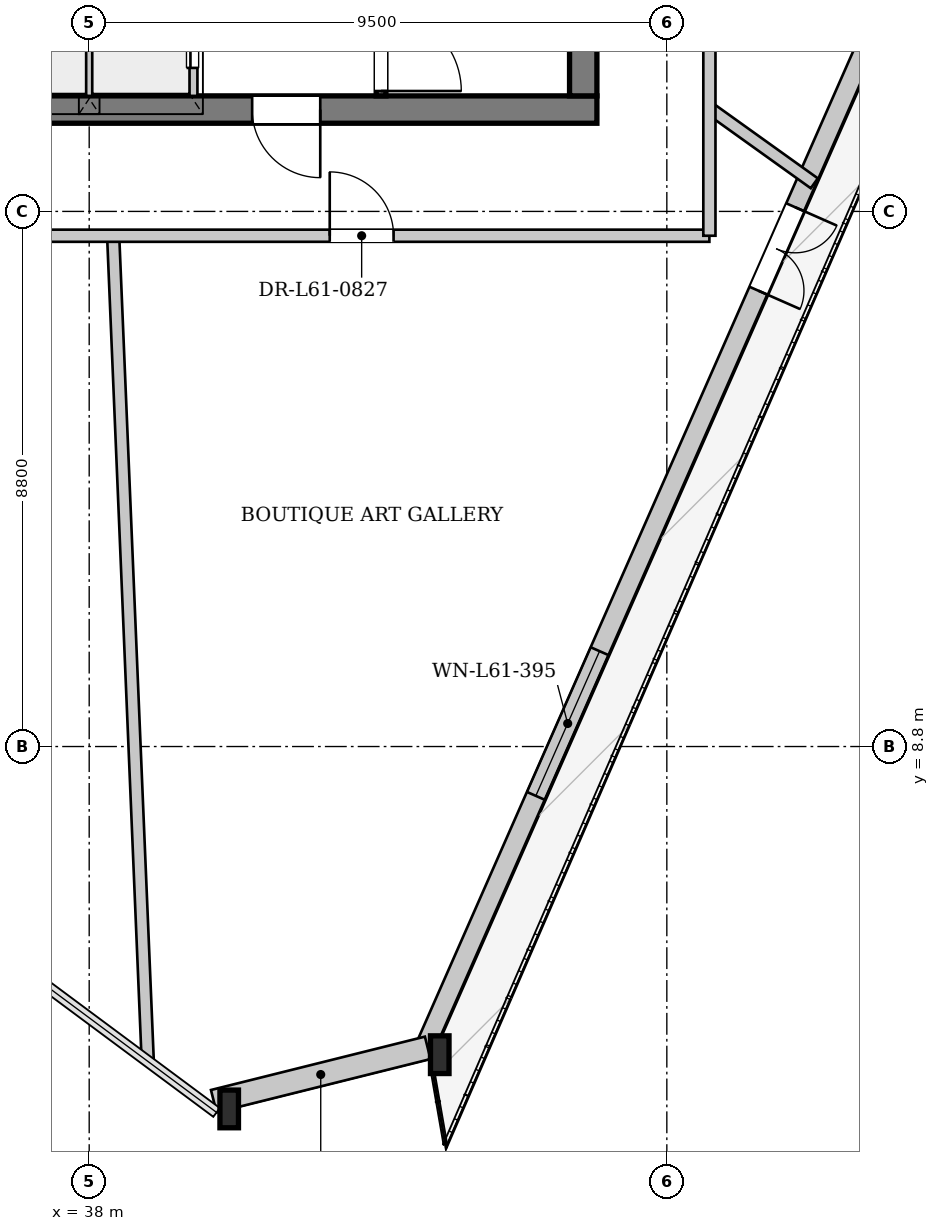
"""IFC4 building model, lengths in metres.
Left out: names, types, materials, properties, quantities, classifications, styles, units other than length and angle.
Written with IfcOpenShell. Run it as: python <this file> out.ifc"""

import sys

from ifc_helpers import new_model, si_unit, direction, frame, frame_2d, origin, origin_2d, place, context, subcontext, project, spatial, rectangle, i_section, extrude, source, transform, mapped, element, fill, save


model = new_model("IFC4")
c1 = context("Model", 3, precision=1e-05, world=origin(), true_north=direction((0.0, 1.0)))
c2 = subcontext(c1, "Body", "Model", "MODEL_VIEW")
j1 = project(units=[si_unit("LENGTHUNIT", "METRE"), si_unit("PLANEANGLEUNIT", "RADIAN")], contexts=[c1])
p1 = place(None, origin())
s1 = spatial("IfcSite", under=j1, at=p1, CompositionType="ELEMENT")
p2 = place(p1, origin())
s2 = spatial("IfcBuilding", under=s1, at=p2, CompositionType="ELEMENT")
p3 = place(p2, frame((0.0, 0.0, 230.9)))
s3 = spatial("IfcBuildingStorey", under=s2, at=p3, CompositionType="ELEMENT", Elevation=230.9)
m1 = source(origin(), c2, "Body", "SweptSolid", [
    extrude(i_section(OverallWidth=0.305, OverallDepth=0.62, WebThickness=0.021, FlangeThickness=0.04, at=origin_2d()), origin(), (0.0, 0.0, 1.0), 3.462),
])
p4 = place(p3, frame((40.095, 2.783, 0.0), z_axis=(0.120094666546, 0.033144153421, 0.992209018383), x_axis=(-0.266037825823, 0.963962590162, 0.0)))
e1 = element("IfcColumn", 1, at=p4, inside=s3, PredefinedType="COLUMN", context=c2, shape_type="MappedRepresentation", body=[
    mapped(m1, transform((0.0, 0.0, 0.0), x_axis=(1.0, 0.0, 0.0), y_axis=(0.0, 1.0, 0.0), z_axis=(0.0, 0.0, 1.0), scale=1.0)),
])
m2 = source(origin(), c2, "Body", "SweptSolid", [
    extrude(i_section(OverallWidth=0.305, OverallDepth=0.62, WebThickness=0.021, FlangeThickness=0.04, at=origin_2d()), origin(), (0.0, 0.0, 1.0), 3.451),
])
p5 = place(p3, frame((43.613, 3.66, 0.0), z_axis=(0.088135401789, 0.041662722034, 0.995236840428), x_axis=(-0.427368834073, 0.90407736376, 0.0)))
e2 = element("IfcColumn", 2, at=p5, inside=s3, PredefinedType="COLUMN", context=c2, shape_type="MappedRepresentation", body=[
    mapped(m2, transform((0.0, 0.0, 0.0), x_axis=(1.0, 0.0, 0.0), y_axis=(0.0, 1.0, 0.0), z_axis=(0.0, 0.0, 1.0), scale=1.0)),
])
p6 = place(p3, frame((52.708, 24.702, 0.0), z_axis=(0.0, 0.0, 1.0), x_axis=(-0.403169735339, -0.915125217938, 0.0)))
e3 = element("IfcWall", 3, at=p6, inside=s3, PredefinedType="SOLIDWALL", context=c2, shape_type="SweptSolid", body=[
    extrude(rectangle(XDim=22.923, YDim=0.32, at=frame_2d((11.461, 0.0))), origin(), (0.0, 0.0, 1.0), 2.872),
])
p7 = place(p6, frame((7.685, 0.0, 0.0)))
e4 = element("IfcOpeningElement", 4, at=p7, cuts=e3, PredefinedType="OPENING", context=c2, shape_type="SweptSolid", body=[
    extrude(rectangle(XDim=1.5, YDim=2.3, at=frame_2d((0.75, 1.15))), frame((0.0, 0.17, 0.0), z_axis=(0.0, -1.0, 0.0), x_axis=(1.0, 0.0, 0.0)), (0.0, 0.0, 1.0), 0.34),
])
p8 = place(p6, frame((15.663, 0.0, 0.402)))
e5 = element("IfcOpeningElement", 5, at=p8, cuts=e3, PredefinedType="OPENING", context=c2, shape_type="SweptSolid", body=[
    extrude(rectangle(XDim=2.6, YDim=2.35, at=frame_2d((1.3, 1.175))), frame((0.0, 0.17, 0.0), z_axis=(0.0, -1.0, 0.0), x_axis=(1.0, 0.0, 0.0)), (0.0, 0.0, 1.0), 0.34),
])
p9 = place(p3, frame((43.567, 3.845, 0.0), z_axis=(0.0, 0.0, 1.0), x_axis=(-0.970284902679, -0.241965302541, 0.0)))
e6 = element("IfcWall", 6, at=p9, inside=s3, PredefinedType="SOLIDWALL", context=c2, shape_type="SweptSolid", body=[
    extrude(rectangle(XDim=3.626, YDim=0.38, at=frame_2d((1.813, 0.0))), origin(), (0.0, 0.0, 1.0), 2.872),
])
p10 = place(p3, frame((46.35, 19.275, 0.0), z_axis=(0.0, 0.0, 1.0), x_axis=(-1.0, 0.0, 0.0)))
e7 = element("IfcWall", 7, at=p10, inside=s3, PredefinedType="SHEAR", context=c2, shape_type="SweptSolid", body=[
    extrude(rectangle(XDim=16.7, YDim=0.45, at=frame_2d((8.35, 0.0))), origin(), (0.0, 0.0, 1.0), 3.38),
])
p11 = place(p10, frame((4.55, 0.0, 0.0)))
e8 = element("IfcOpeningElement", 8, at=p11, cuts=e7, PredefinedType="OPENING", context=c2, shape_type="SweptSolid", body=[
    extrude(rectangle(XDim=1.12, YDim=2.25, at=frame_2d((0.56, 1.125))), frame((0.0, 0.235, 0.0), z_axis=(0.0, -1.0, 0.0), x_axis=(1.0, 0.0, 0.0)), (0.0, 0.0, 1.0), 0.47),
])
p12 = place(p10, frame((11.05, 0.0, 0.0)))
e9 = element("IfcOpeningElement", 9, at=p12, cuts=e7, PredefinedType="OPENING", context=c2, shape_type="SweptSolid", body=[
    extrude(rectangle(XDim=1.12, YDim=2.25, at=frame_2d((0.56, 1.125))), frame((0.0, 0.235, 0.0), z_axis=(0.0, -1.0, 0.0), x_axis=(1.0, 0.0, 0.0)), (0.0, 0.0, 1.0), 0.47),
])
p13 = place(p3, frame((46.125, 33.7, 0.0), z_axis=(0.0, 0.0, 1.0), x_axis=(0.0, -1.0, 0.0)))
e10 = element("IfcWall", 10, at=p13, inside=s3, PredefinedType="SHEAR", context=c2, shape_type="SweptSolid", body=[
    extrude(rectangle(XDim=14.2, YDim=0.45, at=frame_2d((7.1, 0.0))), origin(), (0.0, 0.0, 1.0), 3.38),
])
p14 = place(p13, frame((5.18, 0.0, 0.0)))
e11 = element("IfcOpeningElement", 11, at=p14, cuts=e10, PredefinedType="OPENING", context=c2, shape_type="SweptSolid", body=[
    extrude(rectangle(XDim=1.6, YDim=2.2, at=frame_2d((0.8, 1.1))), frame((0.0, 0.235, 0.0), z_axis=(0.0, -1.0, 0.0), x_axis=(1.0, 0.0, 0.0)), (0.0, 0.0, 1.0), 0.47),
])
p15 = place(p13, frame((2.05, 0.0, 0.0)))
e12 = element("IfcOpeningElement", 12, at=p15, cuts=e10, PredefinedType="OPENING", context=c2, shape_type="SweptSolid", body=[
    extrude(rectangle(XDim=0.95, YDim=2.1, at=frame_2d((0.475, 1.05))), frame((0.0, 0.235, 0.0), z_axis=(0.0, -1.0, 0.0), x_axis=(1.0, 0.0, 0.0)), (0.0, 0.0, 1.0), 0.47),
])
p16 = place(p3, frame((42.8, 26.96, 0.0), z_axis=(0.0, 0.0, 1.0), x_axis=(0.0, -1.0, 0.0)))
e13 = element("IfcWall", 13, at=p16, inside=s3, PredefinedType="PARTITIONING", context=c2, shape_type="SweptSolid", body=[
    extrude(rectangle(XDim=7.46, YDim=0.16, at=frame_2d((3.73, 0.0))), origin(), (0.0, 0.0, 1.0), 3.38),
])
p17 = place(p16, frame((6.06, 0.0, 0.0)))
e14 = element("IfcOpeningElement", 14, at=p17, cuts=e13, PredefinedType="OPENING", context=c2, shape_type="SweptSolid", body=[
    extrude(rectangle(XDim=1.32, YDim=2.2, at=frame_2d((0.66, 1.1))), frame((0.0, 0.09, 0.0), z_axis=(0.0, -1.0, 0.0), x_axis=(1.0, 0.0, 0.0)), (0.0, 0.0, 1.0), 0.18),
])
p18 = place(p3, frame((39.7, 24.28, 0.0), z_axis=(0.0, 0.0, 1.0), x_axis=(0.0, -1.0, 0.0)))
e15 = element("IfcWall", 15, at=p18, inside=s3, PredefinedType="PARTITIONING", context=c2, shape_type="SweptSolid", body=[
    extrude(rectangle(XDim=4.78, YDim=0.16, at=frame_2d((2.39, 0.0))), origin(), (0.0, 0.0, 1.0), 3.38),
])
p19 = place(p18, frame((3.12, 0.0, 0.0)))
e16 = element("IfcOpeningElement", 16, at=p19, cuts=e15, PredefinedType="OPENING", context=c2, shape_type="SweptSolid", body=[
    extrude(rectangle(XDim=1.2, YDim=2.2, at=frame_2d((0.6, 1.1))), frame((0.0, 0.09, 0.0), z_axis=(0.0, -1.0, 0.0), x_axis=(1.0, 0.0, 0.0)), (0.0, 0.0, 1.0), 0.18),
])
p20 = place(p3, frame((38.0, 19.5, 0.0), z_axis=(0.0, 0.0, 1.0), x_axis=(0.0, 1.0, 0.0)))
e17 = element("IfcWall", 17, at=p20, inside=s3, PredefinedType="PARTITIONING", context=c2, shape_type="SweptSolid", body=[
    extrude(rectangle(XDim=2.46, YDim=0.125, at=frame_2d((1.23, 0.0))), origin(), (0.0, 0.0, 1.0), 3.38),
])
p21 = place(p3, frame((38.394, 17.2, 0.0), z_axis=(0.0, 0.0, 1.0), x_axis=(0.041874116011, -0.999122894547, 0.0)))
e18 = element("IfcWall", 18, at=p21, inside=s3, PredefinedType="PARTITIONING", context=c2, shape_type="SweptSolid", body=[
    extrude(rectangle(XDim=13.55, YDim=0.2, at=frame_2d((6.775, 0.0))), origin(), (0.0, 0.0, 1.0), 3.38),
])
p22 = place(p3, frame((48.2, 19.298, 0.0), z_axis=(0.0, 0.0, 1.0), x_axis=(0.813072174006, -0.582162898043, 0.0)))
e19 = element("IfcWall", 19, at=p22, inside=s3, PredefinedType="PARTITIONING", context=c2, shape_type="SweptSolid", body=[
    extrude(rectangle(XDim=2.122, YDim=0.2, at=frame_2d((1.061, 0.0))), origin(), (0.0, 0.0, 1.0), 3.38),
])
p23 = place(p3, frame((27.8, 17.2, 0.0), z_axis=(0.0, 0.0, 1.0), x_axis=(1.0, 0.0, 0.0)))
e20 = element("IfcWall", 20, at=p23, inside=s3, PredefinedType="PARTITIONING", context=c2, shape_type="SweptSolid", body=[
    extrude(rectangle(XDim=20.4, YDim=0.2, at=frame_2d((10.2, 0.0))), origin(), (0.0, 0.0, 1.0), 3.38),
])
p24 = place(p23, frame((7.336, 0.0, 0.0)))
e21 = element("IfcOpeningElement", 21, at=p24, cuts=e20, PredefinedType="OPENING", context=c2, shape_type="SweptSolid", body=[
    extrude(rectangle(XDim=1.05, YDim=2.2, at=frame_2d((0.525, 1.1))), frame((0.0, 0.11, 0.0), z_axis=(0.0, -1.0, 0.0), x_axis=(1.0, 0.0, 0.0)), (0.0, 0.0, 1.0), 0.22),
])
p25 = place(p23, frame((14.156, 0.0, 0.0)))
e22 = element("IfcOpeningElement", 22, at=p25, cuts=e20, PredefinedType="OPENING", context=c2, shape_type="SweptSolid", body=[
    extrude(rectangle(XDim=1.05, YDim=2.2, at=frame_2d((0.525, 1.1))), frame((0.0, 0.11, 0.0), z_axis=(0.0, -1.0, 0.0), x_axis=(1.0, 0.0, 0.0)), (0.0, 0.0, 1.0), 0.22),
])
p26 = place(p3, frame((48.2, 17.2, 0.0), z_axis=(0.0, 0.0, 1.0), x_axis=(0.0, 1.0, 0.0)))
e23 = element("IfcWall", 23, at=p26, inside=s3, PredefinedType="PARTITIONING", context=c2, shape_type="SweptSolid", body=[
    extrude(rectangle(XDim=18.8, YDim=0.2, at=frame_2d((9.4, 0.0))), origin(), (0.0, 0.0, 1.0), 3.005),
])
p27 = place(p26, frame((4.261, 0.0, 0.0)))
e24 = element("IfcOpeningElement", 24, at=p27, cuts=e23, PredefinedType="OPENING", context=c2, shape_type="SweptSolid", body=[
    extrude(rectangle(XDim=1.05, YDim=2.2, at=frame_2d((0.525, 1.1))), frame((0.0, 0.11, 0.0), z_axis=(0.0, -1.0, 0.0), x_axis=(1.0, 0.0, 0.0)), (0.0, 0.0, 1.0), 0.22),
])
p28 = place(p26, frame((17.45, 0.0, 0.0)))
e25 = element("IfcOpeningElement", 25, at=p28, cuts=e23, PredefinedType="OPENING", context=c2, shape_type="SweptSolid", body=[
    extrude(rectangle(XDim=1.05, YDim=2.2, at=frame_2d((0.525, 1.1))), frame((0.0, 0.11, 0.0), z_axis=(0.0, -1.0, 0.0), x_axis=(1.0, 0.0, 0.0)), (0.0, 0.0, 1.0), 0.22),
])
m3 = source(origin(), c2, "Body", "SweptSolid", [
    extrude(rectangle(XDim=1.5, YDim=2.3, at=frame_2d((0.75, 1.15))), frame((0.0, 0.025, 0.0), z_axis=(0.0, -1.0, 0.0), x_axis=(1.0, 0.0, 0.0)), (0.0, 0.0, 1.0), 0.05),
])
p29 = place(p7, origin())
e26 = element("IfcDoor", 26, at=p29, inside=s3, OperationType="DOUBLE_DOOR_SINGLE_SWING", PredefinedType="DOOR", context=c2, shape_type="MappedRepresentation", body=[
    mapped(m3, transform((0.0, 0.0, 0.0), x_axis=(1.0, 0.0, 0.0), y_axis=(0.0, 1.0, 0.0), z_axis=(0.0, 0.0, 1.0), scale=1.0)),
])
fill(e4, e26)
m4 = source(origin(), c2, "Body", "SweptSolid", [
    extrude(rectangle(XDim=2.6, YDim=2.35, at=frame_2d((1.3, 1.175))), frame((0.0, 0.03, 0.0), z_axis=(0.0, -1.0, 0.0), x_axis=(1.0, 0.0, 0.0)), (0.0, 0.0, 1.0), 0.06),
])
p30 = place(p8, origin())
e27 = element("IfcWindow", 27, at=p30, inside=s3, PartitioningType="SINGLE_PANEL", PredefinedType="WINDOW", context=c2, shape_type="MappedRepresentation", body=[
    mapped(m4, transform((0.0, 0.0, 0.0), x_axis=(1.0, 0.0, 0.0), y_axis=(0.0, 1.0, 0.0), z_axis=(0.0, 0.0, 1.0), scale=1.0)),
])
fill(e5, e27)
m5 = source(origin(), c2, "Body", "SweptSolid", [
    extrude(rectangle(XDim=1.12, YDim=2.25, at=frame_2d((0.56, 1.125))), frame((0.0, 0.025, 0.0), z_axis=(0.0, -1.0, 0.0), x_axis=(1.0, 0.0, 0.0)), (0.0, 0.0, 1.0), 0.05),
])
p31 = place(p11, origin())
e28 = element("IfcDoor", 28, at=p31, inside=s3, OperationType="SINGLE_SWING_LEFT", PredefinedType="DOOR", context=c2, shape_type="MappedRepresentation", body=[
    mapped(m5, transform((0.0, 0.0, 0.0), x_axis=(1.0, 0.0, 0.0), y_axis=(0.0, 1.0, 0.0), z_axis=(0.0, 0.0, 1.0), scale=1.0)),
])
fill(e8, e28)
m6 = source(origin(), c2, "Body", "SweptSolid", [
    extrude(rectangle(XDim=1.32, YDim=2.2, at=frame_2d((0.66, 1.1))), frame((0.0, 0.025, 0.0), z_axis=(0.0, -1.0, 0.0), x_axis=(1.0, 0.0, 0.0)), (0.0, 0.0, 1.0), 0.05),
])
p32 = place(p17, origin())
e29 = element("IfcDoor", 29, at=p32, inside=s3, OperationType="SINGLE_SWING_RIGHT", PredefinedType="DOOR", context=c2, shape_type="MappedRepresentation", body=[
    mapped(m6, transform((0.0, 0.0, 0.0), x_axis=(1.0, 0.0, 0.0), y_axis=(0.0, 1.0, 0.0), z_axis=(0.0, 0.0, 1.0), scale=1.0)),
])
fill(e14, e29)
m7 = source(origin(), c2, "Body", "SweptSolid", [
    extrude(rectangle(XDim=1.2, YDim=2.2, at=frame_2d((0.6, 1.1))), frame((0.0, 0.025, 0.0), z_axis=(0.0, -1.0, 0.0), x_axis=(1.0, 0.0, 0.0)), (0.0, 0.0, 1.0), 0.05),
])
p33 = place(p19, origin())
e30 = element("IfcDoor", 30, at=p33, inside=s3, OperationType="DOUBLE_DOOR_SLIDING", PredefinedType="DOOR", context=c2, shape_type="MappedRepresentation", body=[
    mapped(m7, transform((0.0, 0.0, 0.0), x_axis=(1.0, 0.0, 0.0), y_axis=(0.0, 1.0, 0.0), z_axis=(0.0, 0.0, 1.0), scale=1.0)),
])
fill(e16, e30)
m8 = source(origin(), c2, "Body", "SweptSolid", [
    extrude(rectangle(XDim=1.05, YDim=2.2, at=frame_2d((0.525, 1.1))), frame((0.0, 0.025, 0.0), z_axis=(0.0, -1.0, 0.0), x_axis=(1.0, 0.0, 0.0)), (0.0, 0.0, 1.0), 0.05),
])
p34 = place(p25, origin())
e31 = element("IfcDoor", 31, at=p34, inside=s3, OperationType="SINGLE_SWING_LEFT", PredefinedType="DOOR", context=c2, shape_type="MappedRepresentation", body=[
    mapped(m8, transform((0.0, 0.0, 0.0), x_axis=(1.0, 0.0, 0.0), y_axis=(0.0, 1.0, 0.0), z_axis=(0.0, 0.0, 1.0), scale=1.0)),
])
fill(e22, e31)
save(model, sys.argv[1])
